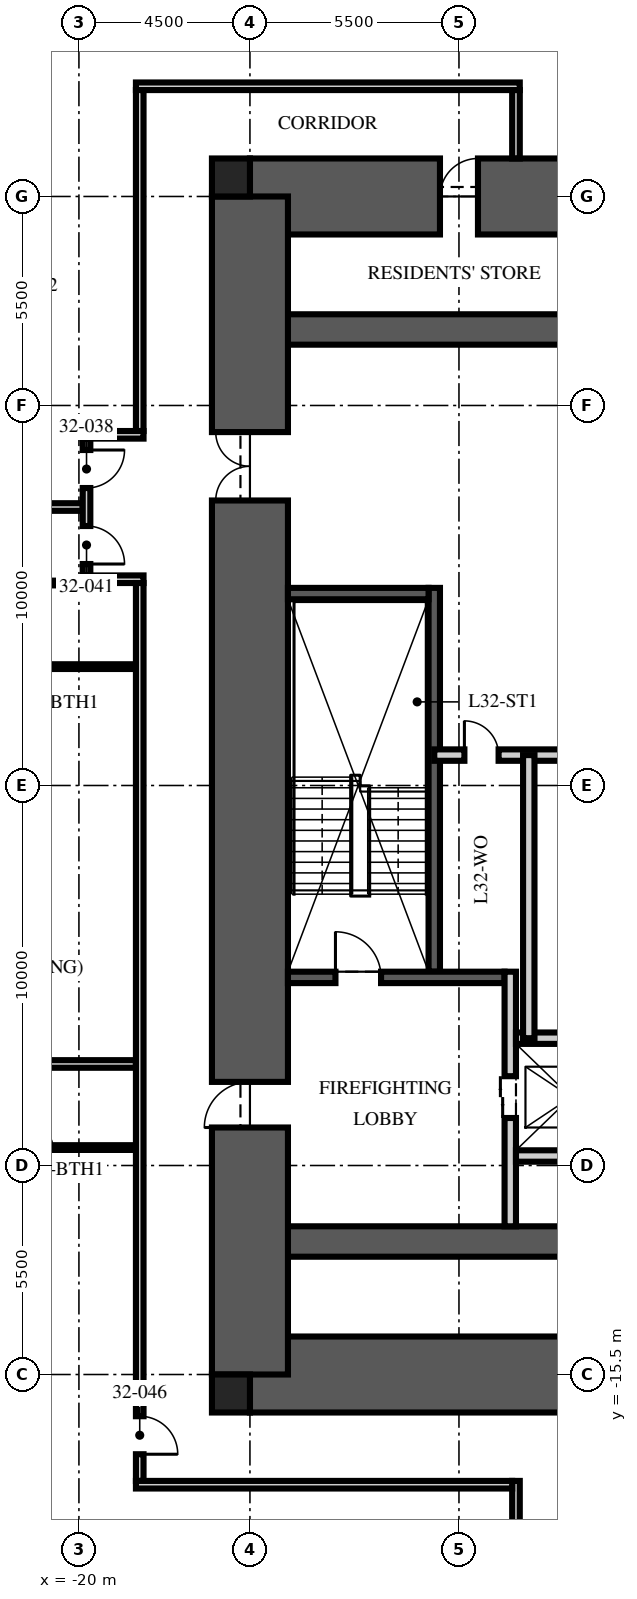
"""IFC4 building model, lengths in metres.
Left out: names, types, materials, properties, quantities, classifications, styles, units other than length and angle.
Written with IfcOpenShell. Run it as: python <this file> out.ifc"""

import sys

from ifc_helpers import new_model, si_unit, direction, frame, frame_2d, origin, origin_2d, place, context, subcontext, project, spatial, rectangle, extrude, element, fill, save


model = new_model("IFC4")
c1 = context("Model", 3, precision=1e-05, world=origin(), true_north=direction((0.0, 1.0)))
c2 = subcontext(c1, "Body", "Model", "MODEL_VIEW")
j1 = project(units=[si_unit("LENGTHUNIT", "METRE"), si_unit("PLANEANGLEUNIT", "RADIAN")], contexts=[c1])
p1 = place(None, origin())
s1 = spatial("IfcSite", under=j1, at=p1, CompositionType="ELEMENT")
p2 = place(p1, origin())
s2 = spatial("IfcBuilding", under=s1, at=p2, CompositionType="ELEMENT")
p3 = place(p2, frame((0.0, 0.0, 129.75)))
s3 = spatial("IfcBuildingStorey", under=s2, at=p3, CompositionType="ELEMENT", Elevation=129.75)
p4 = place(p3, frame((-15.5, 15.5, -0.25), z_axis=(0.0, 0.0, 1.0), x_axis=(1.0, 0.0, 0.0)))
e1 = element("IfcWall", 1, at=p4, inside=s3, PredefinedType="SHEAR", context=c2, shape_type="SweptSolid", body=[
    extrude(rectangle(XDim=31.0, YDim=2.0, at=frame_2d((15.5, 0.0))), origin(), (0.0, 0.0, 1.0), 3.75),
])
p5 = place(p4, frame((5.0, 0.0, 0.25)))
e2 = element("IfcOpeningElement", 2, at=p5, cuts=e1, PredefinedType="OPENING", context=c2, shape_type="SweptSolid", body=[
    extrude(rectangle(XDim=1.0, YDim=2.1, at=frame_2d((0.5, 1.05))), frame((0.0, 1.01, 0.0), z_axis=(0.0, -1.0, 0.0), x_axis=(1.0, 0.0, 0.0)), (0.0, 0.0, 1.0), 2.02),
])
p6 = place(p3, frame((-15.5, -15.5, -0.25), z_axis=(0.0, 0.0, 1.0), x_axis=(1.0, 0.0, 0.0)))
e3 = element("IfcWall", 3, at=p6, inside=s3, PredefinedType="SHEAR", context=c2, shape_type="SweptSolid", body=[
    extrude(rectangle(XDim=31.0, YDim=2.0, at=frame_2d((15.5, 0.0))), origin(), (0.0, 0.0, 1.0), 3.75),
])
p7 = place(p6, frame((10.4, 0.0, 0.25)))
e4 = element("IfcOpeningElement", 4, at=p7, cuts=e3, PredefinedType="OPENING", context=c2, shape_type="SweptSolid", body=[
    extrude(rectangle(XDim=1.1, YDim=2.1, at=frame_2d((0.55, 1.05))), frame((0.0, 1.01, 0.0), z_axis=(0.0, -1.0, 0.0), x_axis=(1.0, 0.0, 0.0)), (0.0, 0.0, 1.0), 2.02),
])
p8 = place(p6, frame((13.5, 0.0, 0.25)))
e5 = element("IfcOpeningElement", 5, at=p8, cuts=e3, PredefinedType="OPENING", context=c2, shape_type="SweptSolid", body=[
    extrude(rectangle(XDim=1.1, YDim=2.1, at=frame_2d((0.55, 1.05))), frame((0.0, 1.01, 0.0), z_axis=(0.0, -1.0, 0.0), x_axis=(1.0, 0.0, 0.0)), (0.0, 0.0, 1.0), 2.02),
])
p9 = place(p6, frame((16.6, 0.0, 0.25)))
e6 = element("IfcOpeningElement", 6, at=p9, cuts=e3, PredefinedType="OPENING", context=c2, shape_type="SweptSolid", body=[
    extrude(rectangle(XDim=1.1, YDim=2.1, at=frame_2d((0.55, 1.05))), frame((0.0, 1.01, 0.0), z_axis=(0.0, -1.0, 0.0), x_axis=(1.0, 0.0, 0.0)), (0.0, 0.0, 1.0), 2.02),
])
for number, where, z_axis, x_axis in (
    (7, (-15.5, 12.0, -0.25), (0.0, 0.0, 1.0), (1.0, 0.0, 0.0)),
    (8, (-15.5, -12.0, -0.25), (0.0, 0.0, 1.0), (1.0, 0.0, 0.0)),
):
    element("IfcWall", number, at=place(p3, frame(where, z_axis=z_axis, x_axis=x_axis)), inside=s3, PredefinedType="SHEAR", context=c2, shape_type="SweptSolid", body=[
        extrude(rectangle(XDim=31.0, YDim=0.8, at=frame_2d((15.5, 0.0))), origin(), (0.0, 0.0, 1.0), 3.75),
    ])
p10 = place(p3, frame((-15.5, -15.5, -0.25), z_axis=(0.0, 0.0, 1.0), x_axis=(0.0, 1.0, 0.0)))
e9 = element("IfcWall", 9, at=p10, inside=s3, PredefinedType="SHEAR", context=c2, shape_type="SweptSolid", body=[
    extrude(rectangle(XDim=31.0, YDim=2.0, at=frame_2d((15.5, 0.0))), origin(), (0.0, 0.0, 1.0), 3.75),
])
p11 = place(p10, frame((6.5, 0.0, 0.25)))
e10 = element("IfcOpeningElement", 10, at=p11, cuts=e9, PredefinedType="OPENING", context=c2, shape_type="SweptSolid", body=[
    extrude(rectangle(XDim=1.2, YDim=2.1, at=frame_2d((0.6, 1.05))), frame((0.0, 1.01, 0.0), z_axis=(0.0, -1.0, 0.0), x_axis=(1.0, 0.0, 0.0)), (0.0, 0.0, 1.0), 2.02),
])
p12 = place(p10, frame((23.0, 0.0, 0.25)))
e11 = element("IfcOpeningElement", 11, at=p12, cuts=e9, PredefinedType="OPENING", context=c2, shape_type="SweptSolid", body=[
    extrude(rectangle(XDim=1.8, YDim=2.1, at=frame_2d((0.9, 1.05))), frame((0.0, 1.01, 0.0), z_axis=(0.0, -1.0, 0.0), x_axis=(1.0, 0.0, 0.0)), (0.0, 0.0, 1.0), 2.02),
])
for number, where, z_axis, x_axis in (
    (12, (-16.0, 16.0, -0.25), (0.0, 0.0, 1.0), (1.0, 0.0, 0.0)),
    (13, (-16.0, -16.0, -0.25), (0.0, 0.0, 1.0), (1.0, 0.0, 0.0)),
):
    element("IfcColumn", number, at=place(p3, frame(where, z_axis=z_axis, x_axis=x_axis)), inside=s3, PredefinedType="COLUMN", context=c2, shape_type="SweptSolid", body=[
        extrude(rectangle(XDim=1.0, YDim=1.0, at=origin_2d()), origin(), (0.0, 0.0, 1.0), 3.75),
    ])
p13 = place(p3, frame((-10.65, -4.9, 0.0), z_axis=(0.0, 0.0, 1.0), x_axis=(0.0, 1.0, 0.0)))
e14 = element("IfcWall", 14, at=p13, inside=s3, PredefinedType="SOLIDWALL", context=c2, shape_type="SweptSolid", body=[
    extrude(rectangle(XDim=10.1, YDim=0.3, at=frame_2d((5.05, 0.0))), origin(), (0.0, 0.0, 1.0), 3.5),
])
p14 = place(p3, frame((-14.5, -5.05, 0.0), z_axis=(0.0, 0.0, 1.0), x_axis=(1.0, 0.0, 0.0)))
e15 = element("IfcWall", 15, at=p14, inside=s3, PredefinedType="SOLIDWALL", context=c2, shape_type="SweptSolid", body=[
    extrude(rectangle(XDim=5.7, YDim=0.3, at=frame_2d((2.85, 0.0))), origin(), (0.0, 0.0, 1.0), 3.5),
])
p15 = place(p14, frame((1.25, 0.0, 0.0)))
e16 = element("IfcOpeningElement", 16, at=p15, cuts=e15, PredefinedType="OPENING", context=c2, shape_type="SweptSolid", body=[
    extrude(rectangle(XDim=1.2, YDim=2.1, at=frame_2d((0.6, 1.05))), frame((0.0, 0.16, 0.0), z_axis=(0.0, -1.0, 0.0), x_axis=(1.0, 0.0, 0.0)), (0.0, 0.0, 1.0), 0.32),
])
p16 = place(p3, frame((-14.5, 5.05, 0.0), z_axis=(0.0, 0.0, 1.0), x_axis=(1.0, 0.0, 0.0)))
e17 = element("IfcWall", 17, at=p16, inside=s3, PredefinedType="SOLIDWALL", context=c2, shape_type="SweptSolid", body=[
    extrude(rectangle(XDim=3.7, YDim=0.3, at=frame_2d((1.85, 0.0))), origin(), (0.0, 0.0, 1.0), 3.5),
])
p17 = place(p3, frame((-8.65, -11.6, 0.0), z_axis=(0.0, 0.0, 1.0), x_axis=(0.0, 1.0, 0.0)))
e18 = element("IfcWall", 18, at=p17, inside=s3, PredefinedType="PARTITIONING", context=c2, shape_type="SweptSolid", body=[
    extrude(rectangle(XDim=6.7, YDim=0.3, at=frame_2d((3.35, 0.0))), origin(), (0.0, 0.0, 1.0), 3.5),
])
p18 = place(p17, frame((2.85, 0.0, 0.0)))
e19 = element("IfcOpeningElement", 19, at=p18, cuts=e18, PredefinedType="OPENING", context=c2, shape_type="SweptSolid", body=[
    extrude(rectangle(XDim=1.1, YDim=2.1, at=frame_2d((0.55, 1.05))), frame((0.0, 0.16, 0.0), z_axis=(0.0, -1.0, 0.0), x_axis=(1.0, 0.0, 0.0)), (0.0, 0.0, 1.0), 0.32),
])
p19 = place(p3, frame((-8.5, -6.65, 0.0), z_axis=(0.0, 0.0, 1.0), x_axis=(1.0, 0.0, 0.0)))
e20 = element("IfcWall", 20, at=p19, inside=s3, PredefinedType="PARTITIONING", context=c2, shape_type="SweptSolid", body=[
    extrude(rectangle(XDim=17.0, YDim=0.3, at=frame_2d((8.5, 0.0))), origin(), (0.0, 0.0, 1.0), 3.5),
])
p20 = place(p19, frame((7.8, 0.0, 0.0)))
e21 = element("IfcOpeningElement", 21, at=p20, cuts=e20, PredefinedType="OPENING", context=c2, shape_type="SweptSolid", body=[
    extrude(rectangle(XDim=1.3, YDim=2.4, at=frame_2d((0.65, 1.2))), frame((0.0, 0.16, 0.0), z_axis=(0.0, -1.0, 0.0), x_axis=(1.0, 0.0, 0.0)), (0.0, 0.0, 1.0), 0.32),
])
p21 = place(p19, frame((5.65, 0.0, 0.0)))
e22 = element("IfcOpeningElement", 22, at=p21, cuts=e20, PredefinedType="OPENING", context=c2, shape_type="SweptSolid", body=[
    extrude(rectangle(XDim=0.9, YDim=2.1, at=frame_2d((0.45, 1.05))), frame((0.0, 0.16, 0.0), z_axis=(0.0, -1.0, 0.0), x_axis=(1.0, 0.0, 0.0)), (0.0, 0.0, 1.0), 0.32),
])
p22 = place(p19, frame((10.4, 0.0, 0.0)))
e23 = element("IfcOpeningElement", 23, at=p22, cuts=e20, PredefinedType="OPENING", context=c2, shape_type="SweptSolid", body=[
    extrude(rectangle(XDim=0.9, YDim=2.1, at=frame_2d((0.45, 1.05))), frame((0.0, 0.16, 0.0), z_axis=(0.0, -1.0, 0.0), x_axis=(1.0, 0.0, 0.0)), (0.0, 0.0, 1.0), 0.32),
])
p23 = place(p3, frame((-8.5, -9.75, 0.0), z_axis=(0.0, 0.0, 1.0), x_axis=(1.0, 0.0, 0.0)))
e24 = element("IfcWall", 24, at=p23, inside=s3, PredefinedType="PARTITIONING", context=c2, shape_type="SweptSolid", body=[
    extrude(rectangle(XDim=2.9, YDim=0.3, at=frame_2d((1.45, 0.0))), origin(), (0.0, 0.0, 1.0), 3.5),
])
p24 = place(p3, frame((-10.65, 0.8, 0.0), z_axis=(0.0, 0.0, 1.0), x_axis=(1.0, 0.0, 0.0)))
e25 = element("IfcWall", 25, at=p24, inside=s3, PredefinedType="PARTITIONING", context=c2, shape_type="SweptSolid", body=[
    extrude(rectangle(XDim=21.3, YDim=0.3, at=frame_2d((10.65, 0.0))), origin(), (0.0, 0.0, 1.0), 3.5),
])
p25 = place(p24, frame((10.05, 0.0, 0.0)))
e26 = element("IfcOpeningElement", 26, at=p25, cuts=e25, PredefinedType="OPENING", context=c2, shape_type="SweptSolid", body=[
    extrude(rectangle(XDim=1.2, YDim=2.1, at=frame_2d((0.6, 1.05))), frame((0.0, 0.16, 0.0), z_axis=(0.0, -1.0, 0.0), x_axis=(1.0, 0.0, 0.0)), (0.0, 0.0, 1.0), 0.32),
])
p26 = place(p24, frame((0.793, 0.0, 0.0)))
e27 = element("IfcOpeningElement", 27, at=p26, cuts=e25, PredefinedType="OPENING", context=c2, shape_type="SweptSolid", body=[
    extrude(rectangle(XDim=0.9, YDim=2.1, at=frame_2d((0.45, 1.05))), frame((0.0, 0.16, 0.0), z_axis=(0.0, -1.0, 0.0), x_axis=(1.0, 0.0, 0.0)), (0.0, 0.0, 1.0), 0.32),
])
p27 = place(p3, frame((-8.163, -6.65, 0.0), z_axis=(0.0, 0.0, 1.0), x_axis=(0.0, 1.0, 0.0)))
e28 = element("IfcWall", 28, at=p27, inside=s3, PredefinedType="PARTITIONING", context=c2, shape_type="SweptSolid", body=[
    extrude(rectangle(XDim=7.45, YDim=0.3, at=frame_2d((3.725, 0.0))), origin(), (0.0, 0.0, 1.0), 3.5),
])
p28 = place(p3, frame((-18.5, 18.4, 0.0), z_axis=(0.0, 0.0, 1.0), x_axis=(1.0, 0.0, 0.0)))
e29 = element("IfcWall", 29, at=p28, inside=s3, PredefinedType="PARTITIONING", context=c2, shape_type="SweptSolid", body=[
    extrude(rectangle(XDim=10.1, YDim=0.2, at=frame_2d((5.05, 0.0))), origin(), (0.0, 0.0, 1.0), 2.3),
])
p29 = place(p3, frame((-8.5, 18.3, 0.0), z_axis=(0.0, 0.0, 1.0), x_axis=(0.0, -1.0, 0.0)))
e30 = element("IfcWall", 30, at=p29, inside=s3, PredefinedType="PARTITIONING", context=c2, shape_type="SweptSolid", body=[
    extrude(rectangle(XDim=1.8, YDim=0.2, at=frame_2d((0.9, 0.0))), origin(), (0.0, 0.0, 1.0), 3.5),
])
p30 = place(p3, frame((-19.9, 7.328, 0.0), z_axis=(0.0, 0.0, 1.0), x_axis=(-1.0, 0.0, 0.0)))
e31 = element("IfcWall", 31, at=p30, inside=s3, PredefinedType="PARTITIONING", context=c2, shape_type="SweptSolid", body=[
    extrude(rectangle(XDim=9.0, YDim=0.2, at=frame_2d((4.5, 0.0))), origin(), (0.0, 0.0, 1.0), 2.81),
])
p31 = place(p3, frame((-18.5, -7.328, 0.0), z_axis=(0.0, 0.0, 1.0), x_axis=(-1.0, 0.0, 0.0)))
e32 = element("IfcWall", 32, at=p31, inside=s3, PredefinedType="PARTITIONING", context=c2, shape_type="SweptSolid", body=[
    extrude(rectangle(XDim=10.4, YDim=0.2, at=frame_2d((5.2, 0.0))), origin(), (0.0, 0.0, 1.0), 2.81),
])
p32 = place(p3, frame((-19.97, 5.328, 0.0), z_axis=(0.0, 0.0, 1.0), x_axis=(-1.0, 0.0, 0.0)))
e33 = element("IfcWall", 33, at=p32, inside=s3, PredefinedType="PARTITIONING", context=c2, shape_type="SweptSolid", body=[
    extrude(rectangle(XDim=2.81, YDim=0.125, at=frame_2d((1.405, 0.0))), origin(), (0.0, 0.0, 1.0), 3.5),
])
for number, where, z_axis, x_axis in (
    (34, (-18.5, 3.128, 0.0), (0.0, 0.0, 1.0), (-1.0, 0.0, 0.0)),
    (35, (-18.5, -9.528, 0.0), (0.0, 0.0, 1.0), (-1.0, 0.0, 0.0)),
):
    element("IfcWall", number, at=place(p3, frame(where, z_axis=z_axis, x_axis=x_axis)), inside=s3, PredefinedType="PARTITIONING", context=c2, shape_type="SweptSolid", body=[
        extrude(rectangle(XDim=4.28, YDim=0.125, at=frame_2d((2.14, 0.0))), origin(), (0.0, 0.0, 1.0), 3.5),
    ])
p33 = place(p3, frame((-18.4, 18.3, 0.0), z_axis=(0.0, 0.0, 1.0), x_axis=(0.0, -1.0, 0.0)))
e36 = element("IfcWall", 36, at=p33, inside=s3, PredefinedType="PARTITIONING", context=c2, shape_type="SweptSolid", body=[
    extrude(rectangle(XDim=8.972, YDim=0.2, at=frame_2d((4.486, 0.0))), origin(), (0.0, 0.0, 1.0), 2.3),
])
p34 = place(p3, frame((-18.3, 9.228, 0.0), z_axis=(0.0, 0.0, 1.0), x_axis=(-1.0, 0.0, 0.0)))
e37 = element("IfcWall", 37, at=p34, inside=s3, PredefinedType="PARTITIONING", context=c2, shape_type="SweptSolid", body=[
    extrude(rectangle(XDim=1.6, YDim=0.2, at=frame_2d((0.8, 0.0))), origin(), (0.0, 0.0, 1.0), 2.7),
])
p35 = place(p3, frame((-18.3, 5.428, 0.0), z_axis=(0.0, 0.0, 1.0), x_axis=(-1.0, 0.0, 0.0)))
e38 = element("IfcWall", 38, at=p35, inside=s3, PredefinedType="PARTITIONING", context=c2, shape_type="SweptSolid", body=[
    extrude(rectangle(XDim=1.6, YDim=0.2, at=frame_2d((0.8, 0.0))), origin(), (0.0, 0.0, 1.0), 3.5),
])
p36 = place(p3, frame((-19.8, 9.128, 0.0), z_axis=(0.0, 0.0, 1.0), x_axis=(0.0, -1.0, 0.0)))
e39 = element("IfcWall", 39, at=p36, inside=s3, PredefinedType="PARTITIONING", context=c2, shape_type="SweptSolid", body=[
    extrude(rectangle(XDim=3.6, YDim=0.2, at=frame_2d((1.8, 0.0))), origin(), (0.0, 0.0, 1.0), 2.7),
])
p37 = place(p36, frame((0.3, 0.0, 0.0)))
e40 = element("IfcOpeningElement", 40, at=p37, cuts=e39, PredefinedType="OPENING", context=c2, shape_type="SweptSolid", body=[
    extrude(rectangle(XDim=1.0, YDim=2.2, at=frame_2d((0.5, 1.1))), frame((0.0, 0.11, 0.0), z_axis=(0.0, -1.0, 0.0), x_axis=(1.0, 0.0, 0.0)), (0.0, 0.0, 1.0), 0.22),
])
p38 = place(p36, frame((2.3, 0.0, 0.0)))
e41 = element("IfcOpeningElement", 41, at=p38, cuts=e39, PredefinedType="OPENING", context=c2, shape_type="SweptSolid", body=[
    extrude(rectangle(XDim=1.0, YDim=2.2, at=frame_2d((0.5, 1.1))), frame((0.0, 0.11, 0.0), z_axis=(0.0, -1.0, 0.0), x_axis=(1.0, 0.0, 0.0)), (0.0, 0.0, 1.0), 0.22),
])
p39 = place(p3, frame((-18.4, 5.328, 0.0), z_axis=(0.0, 0.0, 1.0), x_axis=(0.0, -1.0, 0.0)))
e42 = element("IfcWall", 42, at=p39, inside=s3, PredefinedType="PARTITIONING", context=c2, shape_type="SweptSolid", body=[
    extrude(rectangle(XDim=23.628, YDim=0.2, at=frame_2d((11.814, 0.0))), origin(), (0.0, 0.0, 1.0), 2.3),
])
p40 = place(p39, frame((21.926, 0.0, 0.0)))
e43 = element("IfcOpeningElement", 43, at=p40, cuts=e42, PredefinedType="OPENING", context=c2, shape_type="SweptSolid", body=[
    extrude(rectangle(XDim=1.0, YDim=2.2, at=frame_2d((0.5, 1.1))), frame((0.0, 0.11, 0.0), z_axis=(0.0, -1.0, 0.0), x_axis=(1.0, 0.0, 0.0)), (0.0, 0.0, 1.0), 0.22),
])
p41 = place(p3, frame((-8.5, -18.3, 0.0), z_axis=(0.0, 0.0, 1.0), x_axis=(0.0, -1.0, 0.0)))
e44 = element("IfcWall", 44, at=p41, inside=s3, PredefinedType="PARTITIONING", context=c2, shape_type="SweptSolid", body=[
    extrude(rectangle(XDim=3.0, YDim=0.2, at=frame_2d((1.5, 0.0))), origin(), (0.0, 0.0, 1.0), 3.5),
])
p42 = place(p3, frame((-8.6, -18.4, 0.0), z_axis=(0.0, 0.0, 1.0), x_axis=(-1.0, 0.0, 0.0)))
e45 = element("IfcWall", 45, at=p42, inside=s3, PredefinedType="PARTITIONING", context=c2, shape_type="SweptSolid", body=[
    extrude(rectangle(XDim=9.9, YDim=0.2, at=frame_2d((4.95, 0.0))), origin(), (0.0, 0.0, 1.0), 2.3),
])
p43 = place(p15, origin())
e46 = element("IfcDoor", 46, at=p43, inside=s3, OperationType="SINGLE_SWING_LEFT", PredefinedType="DOOR", context=c2, shape_type="SweptSolid", body=[
    extrude(rectangle(XDim=1.2, YDim=2.1, at=frame_2d((0.6, 1.05))), frame((0.0, 0.025, 0.0), z_axis=(0.0, -1.0, 0.0), x_axis=(1.0, 0.0, 0.0)), (0.0, 0.0, 1.0), 0.05),
])
fill(e16, e46)
p44 = place(p11, origin())
e47 = element("IfcDoor", 47, at=p44, inside=s3, OperationType="SINGLE_SWING_LEFT", PredefinedType="DOOR", context=c2, shape_type="SweptSolid", body=[
    extrude(rectangle(XDim=1.2, YDim=2.1, at=frame_2d((0.6, 1.05))), frame((0.0, 0.025, 0.0), z_axis=(0.0, -1.0, 0.0), x_axis=(1.0, 0.0, 0.0)), (0.0, 0.0, 1.0), 0.05),
])
fill(e10, e47)
p45 = place(p12, origin())
e48 = element("IfcDoor", 48, at=p45, inside=s3, OperationType="DOUBLE_DOOR_SINGLE_SWING", PredefinedType="DOOR", context=c2, shape_type="SweptSolid", body=[
    extrude(rectangle(XDim=1.8, YDim=2.1, at=frame_2d((0.9, 1.05))), frame((0.0, 0.025, 0.0), z_axis=(0.0, -1.0, 0.0), x_axis=(1.0, 0.0, 0.0)), (0.0, 0.0, 1.0), 0.05),
])
fill(e11, e48)
p46 = place(p18, origin())
e49 = element("IfcDoor", 49, at=p46, inside=s3, OperationType="DOUBLE_DOOR_SLIDING", PredefinedType="DOOR", context=c2, shape_type="SweptSolid", body=[
    extrude(rectangle(XDim=1.1, YDim=2.1, at=frame_2d((0.55, 1.05))), frame((0.0, 0.025, 0.0), z_axis=(0.0, -1.0, 0.0), x_axis=(1.0, 0.0, 0.0)), (0.0, 0.0, 1.0), 0.05),
])
fill(e19, e49)
p47 = place(p26, origin())
e50 = element("IfcDoor", 50, at=p47, inside=s3, OperationType="SINGLE_SWING_LEFT", PredefinedType="DOOR", context=c2, shape_type="SweptSolid", body=[
    extrude(rectangle(XDim=0.9, YDim=2.1, at=frame_2d((0.45, 1.05))), frame((0.0, 0.025, 0.0), z_axis=(0.0, -1.0, 0.0), x_axis=(1.0, 0.0, 0.0)), (0.0, 0.0, 1.0), 0.05),
])
fill(e27, e50)
p48 = place(p5, origin())
e51 = element("IfcDoor", 51, at=p48, inside=s3, OperationType="SINGLE_SWING_RIGHT", PredefinedType="DOOR", context=c2, shape_type="SweptSolid", body=[
    extrude(rectangle(XDim=1.0, YDim=2.1, at=frame_2d((0.5, 1.05))), frame((0.0, 0.025, 0.0), z_axis=(0.0, -1.0, 0.0), x_axis=(1.0, 0.0, 0.0)), (0.0, 0.0, 1.0), 0.05),
])
fill(e2, e51)
p49 = place(p37, origin())
e52 = element("IfcDoor", 52, at=p49, inside=s3, OperationType="SINGLE_SWING_LEFT", PredefinedType="DOOR", context=c2, shape_type="SweptSolid", body=[
    extrude(rectangle(XDim=1.0, YDim=2.2, at=frame_2d((0.5, 1.1))), frame((0.0, 0.025, 0.0), z_axis=(0.0, -1.0, 0.0), x_axis=(1.0, 0.0, 0.0)), (0.0, 0.0, 1.0), 0.05),
])
fill(e40, e52)
p50 = place(p38, origin())
e53 = element("IfcDoor", 53, at=p50, inside=s3, OperationType="SINGLE_SWING_RIGHT", PredefinedType="DOOR", context=c2, shape_type="SweptSolid", body=[
    extrude(rectangle(XDim=1.0, YDim=2.2, at=frame_2d((0.5, 1.1))), frame((0.0, 0.025, 0.0), z_axis=(0.0, -1.0, 0.0), x_axis=(1.0, 0.0, 0.0)), (0.0, 0.0, 1.0), 0.05),
])
fill(e41, e53)
p51 = place(p40, origin())
e54 = element("IfcDoor", 54, at=p51, inside=s3, OperationType="SINGLE_SWING_RIGHT", PredefinedType="DOOR", context=c2, shape_type="SweptSolid", body=[
    extrude(rectangle(XDim=1.0, YDim=2.2, at=frame_2d((0.5, 1.1))), frame((0.0, 0.025, 0.0), z_axis=(0.0, -1.0, 0.0), x_axis=(1.0, 0.0, 0.0)), (0.0, 0.0, 1.0), 0.05),
])
fill(e43, e54)
save(model, sys.argv[1])
